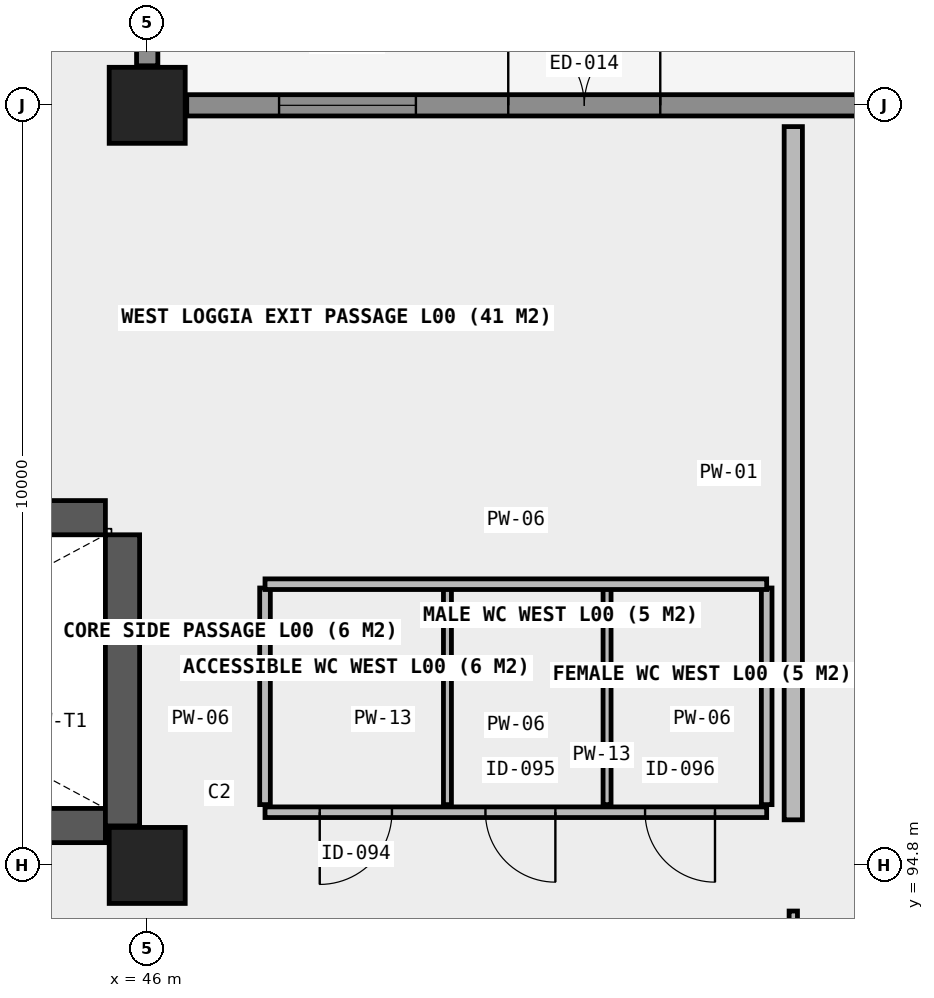
"""IFC4 building model, lengths in metres.
Left out: names, types, materials, properties, quantities, classifications, styles, units other than length and angle.
Written with IfcOpenShell. Run it as: python <this file> out.ifc"""

import sys

from ifc_helpers import new_model, si_unit, direction, frame, frame_2d, origin, origin_2d, place, context, subcontext, project, spatial, rectangle, extrude, element, fill, save


model = new_model("IFC4")
c1 = context("Model", 3, precision=1e-05, world=origin(), true_north=direction((0.0, 1.0)))
c2 = subcontext(c1, "Body", "Model", "MODEL_VIEW")
j1 = project(units=[si_unit("LENGTHUNIT", "METRE"), si_unit("PLANEANGLEUNIT", "RADIAN")], contexts=[c1])
p1 = place(None, origin())
s1 = spatial("IfcSite", under=j1, at=p1, CompositionType="ELEMENT")
p2 = place(p1, origin())
s2 = spatial("IfcBuilding", under=s1, at=p2, CompositionType="ELEMENT")
p3 = place(p2, origin())
s3 = spatial("IfcBuildingStorey", under=s2, at=p3, CompositionType="ELEMENT", Elevation=0.0)
for number, where, z_axis, x_axis in (
    (1, (46.0, 94.8, 0.0), (0.0, 0.0, 1.0), (1.0, 0.0, 0.0)),
    (2, (46.0, 104.8, 0.0), (0.0, 0.0, 1.0), (1.0, 0.0, 0.0)),
):
    element("IfcColumn", number, at=place(p3, frame(where, z_axis=z_axis, x_axis=x_axis)), inside=s3, PredefinedType="COLUMN", context=c2, shape_type="SweptSolid", body=[
        extrude(rectangle(XDim=1.0, YDim=1.0, at=origin_2d()), origin(), (0.0, 0.0, 1.0), 4.2),
    ])
p4 = place(p3, frame((36.35, 95.325, 0.0), z_axis=(0.0, 0.0, 1.0), x_axis=(1.0, 0.0, 0.0)))
e3 = element("IfcWall", 3, at=p4, inside=s3, PredefinedType="SHEAR", context=c2, shape_type="SweptSolid", body=[
    extrude(rectangle(XDim=9.1, YDim=0.45, at=frame_2d((4.55, 0.0))), origin(), (0.0, 0.0, 1.0), 4.2),
])
p5 = place(p3, frame((36.35, 99.375, 0.0), z_axis=(0.0, 0.0, 1.0), x_axis=(1.0, 0.0, 0.0)))
e4 = element("IfcWall", 4, at=p5, inside=s3, PredefinedType="SHEAR", context=c2, shape_type="SweptSolid", body=[
    extrude(rectangle(XDim=9.1, YDim=0.45, at=frame_2d((4.55, 0.0))), origin(), (0.0, 0.0, 1.0), 4.2),
])
p6 = place(p5, frame((0.55, 0.0, 0.0)))
e5 = element("IfcOpeningElement", 5, at=p6, cuts=e4, PredefinedType="OPENING", context=c2, shape_type="SweptSolid", body=[
    extrude(rectangle(XDim=1.13, YDim=2.15, at=frame_2d((0.565, 1.075))), frame((0.0, 0.235, 0.0), z_axis=(0.0, -1.0, 0.0), x_axis=(1.0, 0.0, 0.0)), (0.0, 0.0, 1.0), 0.47),
])
p7 = place(p3, frame((45.675, 95.32, 0.0), z_axis=(0.0, 0.0, 1.0), x_axis=(0.0, 1.0, 0.0)))
e6 = element("IfcWall", 6, at=p7, inside=s3, PredefinedType="SHEAR", context=c2, shape_type="SweptSolid", body=[
    extrude(rectangle(XDim=3.83, YDim=0.45, at=frame_2d((1.915, 0.0))), origin(), (0.0, 0.0, 1.0), 4.2),
])
p8 = place(p3, frame((46.52, 104.8, 0.0), z_axis=(0.0, 0.0, 1.0), x_axis=(1.0, 0.0, 0.0)))
e7 = element("IfcWall", 7, at=p8, inside=s3, PredefinedType="SOLIDWALL", context=c2, shape_type="SweptSolid", body=[
    extrude(rectangle(XDim=10.46, YDim=0.28, at=frame_2d((5.23, 0.0))), origin(), (0.0, 0.0, 1.0), 3.15),
])
p9 = place(p8, frame((4.23, 0.0, 0.0)))
e8 = element("IfcOpeningElement", 8, at=p9, cuts=e7, PredefinedType="OPENING", context=c2, shape_type="SweptSolid", body=[
    extrude(rectangle(XDim=2.0, YDim=2.4, at=frame_2d((1.0, 1.2))), frame((0.0, 0.15, 0.0), z_axis=(0.0, -1.0, 0.0), x_axis=(1.0, 0.0, 0.0)), (0.0, 0.0, 1.0), 0.3),
])
p10 = place(p8, frame((1.215, 0.0, 0.78)))
e9 = element("IfcOpeningElement", 9, at=p10, cuts=e7, PredefinedType="OPENING", context=c2, shape_type="SweptSolid", body=[
    extrude(rectangle(XDim=1.8, YDim=1.95, at=frame_2d((0.9, 0.975))), frame((0.0, 0.15, 0.0), z_axis=(0.0, -1.0, 0.0), x_axis=(1.0, 0.0, 0.0)), (0.0, 0.0, 1.0), 0.3),
])
p11 = place(p3, frame((46.0, 105.32, 0.0), z_axis=(0.0, 0.0, 1.0), x_axis=(0.0, 1.0, 0.0)))
e10 = element("IfcWall", 10, at=p11, inside=s3, PredefinedType="SOLIDWALL", context=c2, shape_type="SweptSolid", body=[
    extrude(rectangle(XDim=8.96, YDim=0.28, at=frame_2d((4.48, 0.0))), origin(), (0.0, 0.0, 1.0), 3.15),
])
p12 = place(p11, frame((0.89, 0.0, 0.85)))
e11 = element("IfcOpeningElement", 11, at=p12, cuts=e10, PredefinedType="OPENING", context=c2, shape_type="SweptSolid", body=[
    extrude(rectangle(XDim=1.8, YDim=1.95, at=frame_2d((0.9, 0.975))), frame((0.0, 0.15, 0.0), z_axis=(0.0, -1.0, 0.0), x_axis=(1.0, 0.0, 0.0)), (0.0, 0.0, 1.0), 0.3),
])
p13 = place(p11, frame((3.58, 0.0, 0.85)))
e12 = element("IfcOpeningElement", 12, at=p13, cuts=e10, PredefinedType="OPENING", context=c2, shape_type="SweptSolid", body=[
    extrude(rectangle(XDim=1.8, YDim=1.95, at=frame_2d((0.9, 0.975))), frame((0.0, 0.15, 0.0), z_axis=(0.0, -1.0, 0.0), x_axis=(1.0, 0.0, 0.0)), (0.0, 0.0, 1.0), 0.3),
])
p14 = place(p11, frame((6.27, 0.0, 0.85)))
e13 = element("IfcOpeningElement", 13, at=p14, cuts=e10, PredefinedType="OPENING", context=c2, shape_type="SweptSolid", body=[
    extrude(rectangle(XDim=1.8, YDim=1.95, at=frame_2d((0.9, 0.975))), frame((0.0, 0.15, 0.0), z_axis=(0.0, -1.0, 0.0), x_axis=(1.0, 0.0, 0.0)), (0.0, 0.0, 1.0), 0.3),
])
p15 = place(p3, frame((47.55, 95.5, 0.0), z_axis=(0.0, 0.0, 1.0), x_axis=(1.0, 0.0, 0.0)))
e14 = element("IfcWall", 14, at=p15, inside=s3, PredefinedType="PLUMBINGWALL", context=c2, shape_type="SweptSolid", body=[
    extrude(rectangle(XDim=6.6, YDim=0.14, at=frame_2d((3.3, 0.0))), origin(), (0.0, 0.0, 1.0), 3.88),
])
p16 = place(p15, frame((0.72, 0.0, 0.0)))
e15 = element("IfcOpeningElement", 15, at=p16, cuts=e14, PredefinedType="OPENING", context=c2, shape_type="SweptSolid", body=[
    extrude(rectangle(XDim=0.95, YDim=2.1, at=frame_2d((0.475, 1.05))), frame((0.0, 0.08, 0.0), z_axis=(0.0, -1.0, 0.0), x_axis=(1.0, 0.0, 0.0)), (0.0, 0.0, 1.0), 0.16),
])
p17 = place(p15, frame((2.9, 0.0, 0.0)))
e16 = element("IfcOpeningElement", 16, at=p17, cuts=e14, PredefinedType="OPENING", context=c2, shape_type="SweptSolid", body=[
    extrude(rectangle(XDim=0.92, YDim=2.1, at=frame_2d((0.46, 1.05))), frame((0.0, 0.08, 0.0), z_axis=(0.0, -1.0, 0.0), x_axis=(1.0, 0.0, 0.0)), (0.0, 0.0, 1.0), 0.16),
])
p18 = place(p15, frame((5.0, 0.0, 0.0)))
e17 = element("IfcOpeningElement", 17, at=p18, cuts=e14, PredefinedType="OPENING", context=c2, shape_type="SweptSolid", body=[
    extrude(rectangle(XDim=0.92, YDim=2.1, at=frame_2d((0.46, 1.05))), frame((0.0, 0.08, 0.0), z_axis=(0.0, -1.0, 0.0), x_axis=(1.0, 0.0, 0.0)), (0.0, 0.0, 1.0), 0.16),
])
p19 = place(p3, frame((47.55, 95.6, 0.0), z_axis=(0.0, 0.0, 1.0), x_axis=(0.0, 1.0, 0.0)))
e18 = element("IfcWall", 18, at=p19, inside=s3, PredefinedType="PLUMBINGWALL", context=c2, shape_type="SweptSolid", body=[
    extrude(rectangle(XDim=2.85, YDim=0.14, at=frame_2d((1.425, 0.0))), origin(), (0.0, 0.0, 1.0), 3.88),
])
p20 = place(p3, frame((49.95, 95.6, 0.0), z_axis=(0.0, 0.0, 1.0), x_axis=(0.0, 1.0, 0.0)))
e19 = element("IfcWall", 19, at=p20, inside=s3, PredefinedType="PARTITIONING", context=c2, shape_type="SweptSolid", body=[
    extrude(rectangle(XDim=2.85, YDim=0.105, at=frame_2d((1.425, 0.0))), origin(), (0.0, 0.0, 1.0), 3.4),
])
p21 = place(p3, frame((52.05, 95.6, 0.0), z_axis=(0.0, 0.0, 1.0), x_axis=(0.0, 1.0, 0.0)))
e20 = element("IfcWall", 20, at=p21, inside=s3, PredefinedType="PARTITIONING", context=c2, shape_type="SweptSolid", body=[
    extrude(rectangle(XDim=2.85, YDim=0.105, at=frame_2d((1.425, 0.0))), origin(), (0.0, 0.0, 1.0), 3.88),
])
p22 = place(p3, frame((54.15, 95.6, 0.0), z_axis=(0.0, 0.0, 1.0), x_axis=(0.0, 1.0, 0.0)))
e21 = element("IfcWall", 21, at=p22, inside=s3, PredefinedType="PLUMBINGWALL", context=c2, shape_type="SweptSolid", body=[
    extrude(rectangle(XDim=2.85, YDim=0.14, at=frame_2d((1.425, 0.0))), origin(), (0.0, 0.0, 1.0), 3.88),
])
p23 = place(p3, frame((47.55, 98.5, 0.0), z_axis=(0.0, 0.0, 1.0), x_axis=(1.0, 0.0, 0.0)))
e22 = element("IfcWall", 22, at=p23, inside=s3, PredefinedType="PLUMBINGWALL", context=c2, shape_type="SweptSolid", body=[
    extrude(rectangle(XDim=6.6, YDim=0.14, at=frame_2d((3.3, 0.0))), origin(), (0.0, 0.0, 1.0), 3.88),
])
p24 = place(p3, frame((54.5, 86.4, 0.0), z_axis=(0.0, 0.0, 1.0), x_axis=(0.0, 1.0, 0.0)))
e23 = element("IfcWall", 23, at=p24, inside=s3, PredefinedType="MOVABLE", context=c2, shape_type="SweptSolid", body=[
    extrude(rectangle(XDim=7.8, YDim=0.11, at=frame_2d((3.9, 0.0))), origin(), (0.0, 0.0, 1.0), 3.88),
])
p25 = place(p24, frame((2.8, 0.0, 0.0)))
e24 = element("IfcOpeningElement", 24, at=p25, cuts=e23, PredefinedType="OPENING", context=c2, shape_type="SweptSolid", body=[
    extrude(rectangle(XDim=2.2, YDim=2.4, at=frame_2d((1.1, 1.2))), frame((0.0, 0.065, 0.0), z_axis=(0.0, -1.0, 0.0), x_axis=(1.0, 0.0, 0.0)), (0.0, 0.0, 1.0), 0.13),
])
p26 = place(p3, frame((54.5, 95.4, 0.0), z_axis=(0.0, 0.0, 1.0), x_axis=(0.0, 1.0, 0.0)))
e25 = element("IfcWall", 25, at=p26, inside=s3, PredefinedType="SOLIDWALL", context=c2, shape_type="SweptSolid", body=[
    extrude(rectangle(XDim=9.12, YDim=0.24, at=frame_2d((4.56, 0.0))), origin(), (0.0, 0.0, 1.0), 3.88),
])
p27 = place(p9, origin())
e26 = element("IfcDoor", 26, at=p27, inside=s3, OperationType="DOUBLE_DOOR_SINGLE_SWING", PredefinedType="DOOR", context=c2, shape_type="SweptSolid", body=[
    extrude(rectangle(XDim=2.0, YDim=2.4, at=frame_2d((1.0, 1.2))), frame((0.0, 0.025, 0.0), z_axis=(0.0, -1.0, 0.0), x_axis=(1.0, 0.0, 0.0)), (0.0, 0.0, 1.0), 0.05),
])
fill(e8, e26)
p28 = place(p10, origin())
e27 = element("IfcWindow", 27, at=p28, inside=s3, PartitioningType="SINGLE_PANEL", PredefinedType="WINDOW", context=c2, shape_type="SweptSolid", body=[
    extrude(rectangle(XDim=1.8, YDim=1.95, at=frame_2d((0.9, 0.975))), frame((0.0, 0.03, 0.0), z_axis=(0.0, -1.0, 0.0), x_axis=(1.0, 0.0, 0.0)), (0.0, 0.0, 1.0), 0.06),
])
fill(e9, e27)
p29 = place(p16, frame((0.475, 0.0, 0.0), z_axis=(0.0, 0.0, 1.0), x_axis=(-1.0, 0.0, 0.0)))
e28 = element("IfcDoor", 28, at=p29, inside=s3, OperationType="SINGLE_SWING_LEFT", PredefinedType="DOOR", context=c2, shape_type="SweptSolid", body=[
    extrude(rectangle(XDim=0.95, YDim=2.1, at=frame_2d((0.0, 1.05))), frame((0.0, 0.025, 0.0), z_axis=(0.0, -1.0, 0.0), x_axis=(1.0, 0.0, 0.0)), (0.0, 0.0, 1.0), 0.05),
])
fill(e15, e28)
p30 = place(p17, origin())
e29 = element("IfcDoor", 29, at=p30, inside=s3, OperationType="SINGLE_SWING_RIGHT", PredefinedType="DOOR", context=c2, shape_type="SweptSolid", body=[
    extrude(rectangle(XDim=0.92, YDim=2.1, at=frame_2d((0.46, 1.05))), frame((0.0, 0.025, 0.0), z_axis=(0.0, -1.0, 0.0), x_axis=(1.0, 0.0, 0.0)), (0.0, 0.0, 1.0), 0.05),
])
fill(e16, e29)
p31 = place(p18, origin())
e30 = element("IfcDoor", 30, at=p31, inside=s3, OperationType="SINGLE_SWING_RIGHT", PredefinedType="DOOR", context=c2, shape_type="SweptSolid", body=[
    extrude(rectangle(XDim=0.92, YDim=2.1, at=frame_2d((0.46, 1.05))), frame((0.0, 0.025, 0.0), z_axis=(0.0, -1.0, 0.0), x_axis=(1.0, 0.0, 0.0)), (0.0, 0.0, 1.0), 0.05),
])
fill(e17, e30)
save(model, sys.argv[1])
